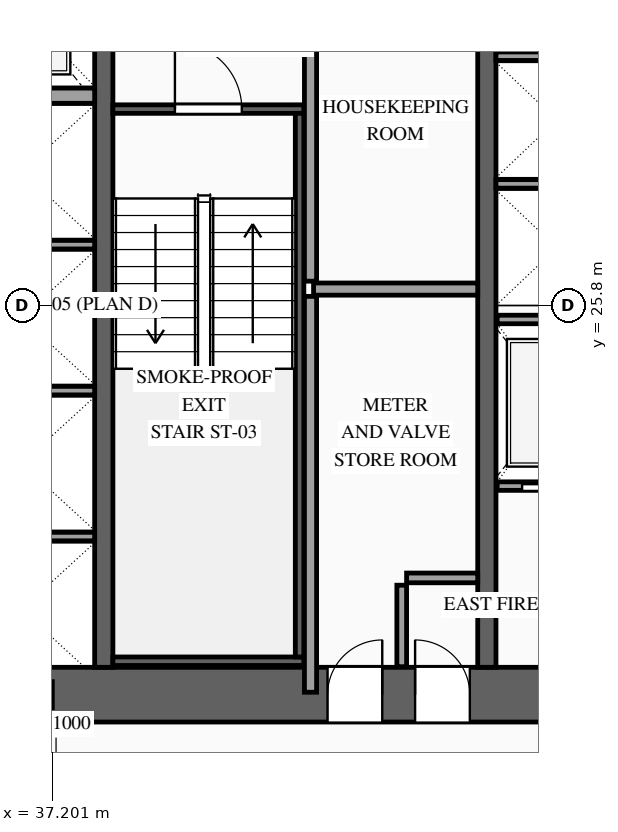
"""IFC4 building model, lengths in metres.
Left out: names, types, materials, properties, quantities, classifications, styles, units other than length and angle.
Written with IfcOpenShell. Run it as: python <this file> out.ifc"""

import sys

from ifc_helpers import new_model, si_unit, direction, frame, frame_2d, origin, origin_2d, place, context, subcontext, project, spatial, rectangle, i_section, extrude, source, transform, mapped, element, fill, save


model = new_model("IFC4")
c1 = context("Model", 3, precision=1e-05, world=origin(), true_north=direction((0.0, 1.0)))
c2 = subcontext(c1, "Body", "Model", "MODEL_VIEW")
j1 = project(units=[si_unit("LENGTHUNIT", "METRE"), si_unit("PLANEANGLEUNIT", "RADIAN")], contexts=[c1])
p1 = place(None, origin())
s1 = spatial("IfcSite", under=j1, at=p1, CompositionType="ELEMENT")
p2 = place(p1, origin())
s2 = spatial("IfcBuilding", under=s1, at=p2, CompositionType="ELEMENT")
p3 = place(p2, frame((0.0, 0.0, 46.0)))
s3 = spatial("IfcBuildingStorey", under=s2, at=p3, CompositionType="ELEMENT", Elevation=46.0)
p4 = place(p3, frame((23.35, 19.4, 0.0), z_axis=(0.0, 0.0, 1.0), x_axis=(1.0, 0.0, 0.0)))
e1 = element("IfcWall", 1, at=p4, inside=s3, PredefinedType="SHEAR", context=c2, shape_type="SweptSolid", body=[
    extrude(rectangle(XDim=27.3, YDim=0.9, at=frame_2d((13.65, 0.0))), origin(), (0.0, 0.0, 1.0), 3.6),
])
p5 = place(p4, frame((2.1, 0.0, 0.0)))
e2 = element("IfcOpeningElement", 2, at=p5, cuts=e1, PredefinedType="OPENING", context=c2, shape_type="SweptSolid", body=[
    extrude(rectangle(XDim=1.1, YDim=2.2, at=frame_2d((0.55, 1.1))), frame((0.0, 0.465, 0.0), z_axis=(0.0, -1.0, 0.0), x_axis=(1.0, 0.0, 0.0)), (0.0, 0.0, 1.0), 0.93),
])
p6 = place(p4, frame((10.0, 0.0, 0.0)))
e3 = element("IfcOpeningElement", 3, at=p6, cuts=e1, PredefinedType="OPENING", context=c2, shape_type="SweptSolid", body=[
    extrude(rectangle(XDim=1.1, YDim=2.2, at=frame_2d((0.55, 1.1))), frame((0.0, 0.465, 0.0), z_axis=(0.0, -1.0, 0.0), x_axis=(1.0, 0.0, 0.0)), (0.0, 0.0, 1.0), 0.93),
])
p7 = place(p4, frame((23.2, 0.0, 0.0)))
e4 = element("IfcOpeningElement", 4, at=p7, cuts=e1, PredefinedType="OPENING", context=c2, shape_type="SweptSolid", body=[
    extrude(rectangle(XDim=1.1, YDim=2.2, at=frame_2d((0.55, 1.1))), frame((0.0, 0.465, 0.0), z_axis=(0.0, -1.0, 0.0), x_axis=(1.0, 0.0, 0.0)), (0.0, 0.0, 1.0), 0.93),
])
p8 = place(p4, frame((19.82, 0.0, 0.0)))
e5 = element("IfcOpeningElement", 5, at=p8, cuts=e1, PredefinedType="OPENING", context=c2, shape_type="SweptSolid", body=[
    extrude(rectangle(XDim=0.9, YDim=2.15, at=frame_2d((0.45, 1.075))), frame((0.0, 0.465, 0.0), z_axis=(0.0, -1.0, 0.0), x_axis=(1.0, 0.0, 0.0)), (0.0, 0.0, 1.0), 0.93),
])
p9 = place(p4, frame((18.38, 0.0, 0.0)))
e6 = element("IfcOpeningElement", 6, at=p9, cuts=e1, PredefinedType="OPENING", context=c2, shape_type="SweptSolid", body=[
    extrude(rectangle(XDim=0.9, YDim=2.15, at=frame_2d((0.45, 1.075))), frame((0.0, 0.465, 0.0), z_axis=(0.0, -1.0, 0.0), x_axis=(1.0, 0.0, 0.0)), (0.0, 0.0, 1.0), 0.93),
])
m1 = source(origin(), c2, "Body", "SweptSolid", [
    extrude(rectangle(XDim=11.9, YDim=0.3, at=frame_2d((5.95, 0.0))), origin(), (0.0, 0.0, 1.0), 3.6),
])
for number, where, z_axis, x_axis in (
    (7, (38.05, 19.85, 0.0), (0.0, 0.0, 1.0), (0.0, 1.0, 0.0)),
    (8, (44.35, 19.85, 0.0), (0.0, 0.0, 1.0), (0.0, 1.0, 0.0)),
):
    element("IfcWall", number, at=place(p3, frame(where, z_axis=z_axis, x_axis=x_axis)), inside=s3, PredefinedType="SOLIDWALL", context=c2, shape_type="MappedRepresentation", body=[
        mapped(m1, transform((0.0, 0.0, 0.0), scale=1.0)),
    ])
m2 = source(origin(), c2, "Body", "SweptSolid", [
    extrude(i_section(OverallWidth=0.407, OverallDepth=0.428, WebThickness=0.02, FlangeThickness=0.035, at=origin_2d()), origin(), (0.0, 0.0, 1.0), 3.6),
])
p10 = place(p3, frame((37.0, 19.4, 0.0), z_axis=(0.0, 0.0, 1.0), x_axis=(1.0, 0.0, 0.0)))
e9 = element("IfcColumn", 9, at=p10, inside=s3, PredefinedType="COLUMN", context=c2, shape_type="MappedRepresentation", body=[
    mapped(m2, transform((0.0, 0.0, 0.0), scale=1.0)),
])
p11 = place(p3, frame((44.52, 22.83, 0.0), z_axis=(0.0, 0.0, 1.0), x_axis=(1.0, 0.0, 0.0)))
e10 = element("IfcWall", 10, at=p11, inside=s3, PredefinedType="SOLIDWALL", context=c2, shape_type="SweptSolid", body=[
    extrude(rectangle(XDim=1.92, YDim=0.14, at=frame_2d((0.96, 0.0))), origin(), (0.0, 0.0, 1.0), 3.38),
])
p12 = place(p11, frame((0.41, 0.0, 0.0)))
e11 = element("IfcOpeningElement", 11, at=p12, cuts=e10, PredefinedType="OPENING", context=c2, shape_type="SweptSolid", body=[
    extrude(rectangle(XDim=1.1, YDim=2.2, at=frame_2d((0.55, 1.1))), frame((0.0, 0.085, 0.0), z_axis=(0.0, -1.0, 0.0), x_axis=(1.0, 0.0, 0.0)), (0.0, 0.0, 1.0), 0.17),
])
m3 = source(origin(), c2, "Body", "SweptSolid", [
    extrude(rectangle(XDim=1.92, YDim=0.14, at=frame_2d((0.96, 0.0))), origin(), (0.0, 0.0, 1.0), 3.38),
])
p13 = place(p3, frame((44.52, 25.57, 0.0), z_axis=(0.0, 0.0, 1.0), x_axis=(1.0, 0.0, 0.0)))
e12 = element("IfcWall", 12, at=p13, inside=s3, PredefinedType="SOLIDWALL", context=c2, shape_type="MappedRepresentation", body=[
    mapped(m3, transform((0.0, 0.0, 0.0), scale=1.0)),
])
m4 = source(origin(), c2, "Body", "SweptSolid", [
    extrude(rectangle(XDim=2.4, YDim=0.14, at=frame_2d((1.2, 0.0))), origin(), (0.0, 0.0, 1.0), 3.38),
])
for number, where, z_axis, x_axis in (
    (13, (35.5, 22.0, 0.0), (0.0, 0.0, 1.0), (1.0, 0.0, 0.0)),
    (14, (35.5, 24.4, 0.0), (0.0, 0.0, 1.0), (1.0, 0.0, 0.0)),
    (15, (35.5, 26.8, 0.0), (0.0, 0.0, 1.0), (1.0, 0.0, 0.0)),
):
    element("IfcWall", number, at=place(p3, frame(where, z_axis=z_axis, x_axis=x_axis)), inside=s3, PredefinedType="SOLIDWALL", context=c2, shape_type="MappedRepresentation", body=[
        mapped(m4, transform((0.0, 0.0, 0.0), scale=1.0)),
    ])
m5 = source(origin(), c2, "Body", "SweptSolid", [
    extrude(rectangle(XDim=2.4, YDim=0.25, at=frame_2d((1.2, 0.0))), origin(), (0.0, 0.0, 1.0), 3.38),
])
p14 = place(p3, frame((35.5, 29.25, 0.0), z_axis=(0.0, 0.0, 1.0), x_axis=(1.0, 0.0, 0.0)))
e16 = element("IfcWall", 16, at=p14, inside=s3, PredefinedType="SOLIDWALL", context=c2, shape_type="MappedRepresentation", body=[
    mapped(m5, transform((0.0, 0.0, 0.0), scale=1.0)),
])
m6 = source(origin(), c2, "Body", "SweptSolid", [
    extrude(rectangle(XDim=2.0, YDim=0.14, at=frame_2d((1.0, 0.0))), origin(), (0.0, 0.0, 1.0), 3.38),
])
for number, where, z_axis, x_axis in (
    (17, (44.5, 27.8, 0.0), (0.0, 0.0, 1.0), (1.0, 0.0, 0.0)),
    (18, (44.5, 29.9, 0.0), (0.0, 0.0, 1.0), (1.0, 0.0, 0.0)),
):
    element("IfcWall", number, at=place(p3, frame(where, z_axis=z_axis, x_axis=x_axis)), inside=s3, PredefinedType="SOLIDWALL", context=c2, shape_type="MappedRepresentation", body=[
        mapped(m6, transform((0.0, 0.0, 0.0), scale=1.0)),
    ])
p15 = place(p3, frame((38.2, 29.03, 0.0), z_axis=(0.0, 0.0, 1.0), x_axis=(1.0, 0.0, 0.0)))
e19 = element("IfcWall", 19, at=p15, inside=s3, PredefinedType="SOLIDWALL", context=c2, shape_type="SweptSolid", body=[
    extrude(rectangle(XDim=3.14, YDim=0.14, at=frame_2d((1.57, 0.0))), origin(), (0.0, 0.0, 1.0), 3.38),
])
p16 = place(p15, frame((1.02, 0.0, 0.0)))
e20 = element("IfcOpeningElement", 20, at=p16, cuts=e19, PredefinedType="OPENING", context=c2, shape_type="SweptSolid", body=[
    extrude(rectangle(XDim=1.1, YDim=2.2, at=frame_2d((0.55, 1.1))), frame((0.0, 0.085, 0.0), z_axis=(0.0, -1.0, 0.0), x_axis=(1.0, 0.0, 0.0)), (0.0, 0.0, 1.0), 0.17),
])
m7 = source(origin(), c2, "Body", "SweptSolid", [
    extrude(rectangle(XDim=3.14, YDim=0.14, at=frame_2d((1.57, 0.0))), origin(), (0.0, 0.0, 1.0), 3.38),
])
p17 = place(p3, frame((38.2, 19.95, 0.0), z_axis=(0.0, 0.0, 1.0), x_axis=(1.0, 0.0, 0.0)))
e21 = element("IfcWall", 21, at=p17, inside=s3, PredefinedType="SOLIDWALL", context=c2, shape_type="MappedRepresentation", body=[
    mapped(m7, transform((0.0, 0.0, 0.0), scale=1.0)),
])
m8 = source(origin(), c2, "Body", "SweptSolid", [
    extrude(rectangle(XDim=8.94, YDim=0.14, at=frame_2d((4.47, 0.0))), origin(), (0.0, 0.0, 1.0), 3.38),
])
p18 = place(p3, frame((41.27, 20.02, 0.0), z_axis=(0.0, 0.0, 1.0), x_axis=(0.0, 1.0, 0.0)))
e22 = element("IfcWall", 22, at=p18, inside=s3, PredefinedType="SOLIDWALL", context=c2, shape_type="MappedRepresentation", body=[
    mapped(m8, transform((0.0, 0.0, 0.0), scale=1.0)),
])
m9 = source(origin(), c2, "Body", "SweptSolid", [
    extrude(rectangle(XDim=1.34, YDim=0.16, at=frame_2d((0.67, 0.0))), origin(), (0.0, 0.0, 1.0), 3.38),
])
p19 = place(p3, frame((42.95, 19.86, 0.0), z_axis=(0.0, 0.0, 1.0), x_axis=(0.0, 1.0, 0.0)))
e23 = element("IfcWall", 23, at=p19, inside=s3, PredefinedType="PARTITIONING", context=c2, shape_type="MappedRepresentation", body=[
    mapped(m9, transform((0.0, 0.0, 0.0), scale=1.0)),
])
m10 = source(origin(), c2, "Body", "SweptSolid", [
    extrude(rectangle(XDim=1.17, YDim=0.16, at=frame_2d((0.585, 0.0))), origin(), (0.0, 0.0, 1.0), 3.38),
])
p20 = place(p3, frame((43.03, 21.32, 0.0), z_axis=(0.0, 0.0, 1.0), x_axis=(1.0, 0.0, 0.0)))
e24 = element("IfcWall", 24, at=p20, inside=s3, PredefinedType="PARTITIONING", context=c2, shape_type="MappedRepresentation", body=[
    mapped(m10, transform((0.0, 0.0, 0.0), scale=1.0)),
])
m11 = source(origin(), c2, "Body", "SweptSolid", [
    extrude(rectangle(XDim=6.51, YDim=0.2, at=frame_2d((3.255, 0.0))), origin(), (0.0, 0.0, 1.0), 3.38),
])
p21 = place(p3, frame((41.45, 19.44, 0.0), z_axis=(0.0, 0.0, 1.0), x_axis=(0.0, 1.0, 0.0)))
e25 = element("IfcWall", 25, at=p21, inside=s3, PredefinedType="PARTITIONING", context=c2, shape_type="MappedRepresentation", body=[
    mapped(m11, transform((0.0, 0.0, 0.0), scale=1.0)),
])
m12 = source(origin(), c2, "Body", "SweptSolid", [
    extrude(rectangle(XDim=2.7, YDim=0.2, at=frame_2d((1.35, 0.0))), origin(), (0.0, 0.0, 1.0), 3.38),
])
p22 = place(p3, frame((41.5, 26.07, 0.0), z_axis=(0.0, 0.0, 1.0), x_axis=(1.0, 0.0, 0.0)))
e26 = element("IfcWall", 26, at=p22, inside=s3, PredefinedType="PARTITIONING", context=c2, shape_type="MappedRepresentation", body=[
    mapped(m12, transform((0.0, 0.0, 0.0), scale=1.0)),
])
m13 = source(origin(), c2, "Body", "SweptSolid", [
    extrude(rectangle(XDim=5.96, YDim=0.2, at=frame_2d((2.98, 0.0))), origin(), (0.0, 0.0, 1.0), 3.38),
])
p23 = place(p3, frame((41.45, 26.2, 0.0), z_axis=(0.0, 0.0, 1.0), x_axis=(0.0, 1.0, 0.0)))
e27 = element("IfcWall", 27, at=p23, inside=s3, PredefinedType="PARTITIONING", context=c2, shape_type="MappedRepresentation", body=[
    mapped(m13, transform((0.0, 0.0, 0.0), scale=1.0)),
])
m14 = source(origin(), c2, "Body", "SweptSolid", [
    extrude(rectangle(XDim=1.1, YDim=2.2, at=frame_2d((0.55, 1.1))), frame((0.0, 0.025, 0.0), z_axis=(0.0, -1.0, 0.0), x_axis=(1.0, 0.0, 0.0)), (0.0, 0.0, 1.0), 0.05),
])
p24 = place(p12, origin())
e28 = element("IfcDoor", 28, at=p24, inside=s3, OperationType="SLIDING_TO_RIGHT", PredefinedType="DOOR", context=c2, shape_type="MappedRepresentation", body=[
    mapped(m14, transform((0.0, 0.0, 0.0), scale=1.0)),
])
fill(e11, e28)
m15 = source(origin(), c2, "Body", "SweptSolid", [
    extrude(rectangle(XDim=1.1, YDim=2.2, at=frame_2d((0.55, 1.1))), frame((0.0, 0.025, 0.0), z_axis=(0.0, -1.0, 0.0), x_axis=(1.0, 0.0, 0.0)), (0.0, 0.0, 1.0), 0.05),
])
p25 = place(p16, origin())
e29 = element("IfcDoor", 29, at=p25, inside=s3, OperationType="SINGLE_SWING_LEFT", PredefinedType="DOOR", context=c2, shape_type="MappedRepresentation", body=[
    mapped(m15, transform((0.0, 0.0, 0.0), scale=1.0)),
])
fill(e20, e29)
m16 = source(origin(), c2, "Body", "SweptSolid", [
    extrude(rectangle(XDim=0.9, YDim=2.15, at=frame_2d((0.45, 1.075))), frame((0.0, 0.025, 0.0), z_axis=(0.0, -1.0, 0.0), x_axis=(1.0, 0.0, 0.0)), (0.0, 0.0, 1.0), 0.05),
])
p26 = place(p8, origin())
e30 = element("IfcDoor", 30, at=p26, inside=s3, OperationType="SINGLE_SWING_LEFT", PredefinedType="DOOR", context=c2, shape_type="MappedRepresentation", body=[
    mapped(m16, transform((0.0, 0.0, 0.0), scale=1.0)),
])
fill(e5, e30)
p27 = place(p9, origin())
e31 = element("IfcDoor", 31, at=p27, inside=s3, OperationType="SINGLE_SWING_RIGHT", PredefinedType="DOOR", context=c2, shape_type="MappedRepresentation", body=[
    mapped(m16, transform((0.0, 0.0, 0.0), scale=1.0)),
])
fill(e6, e31)
save(model, sys.argv[1])
